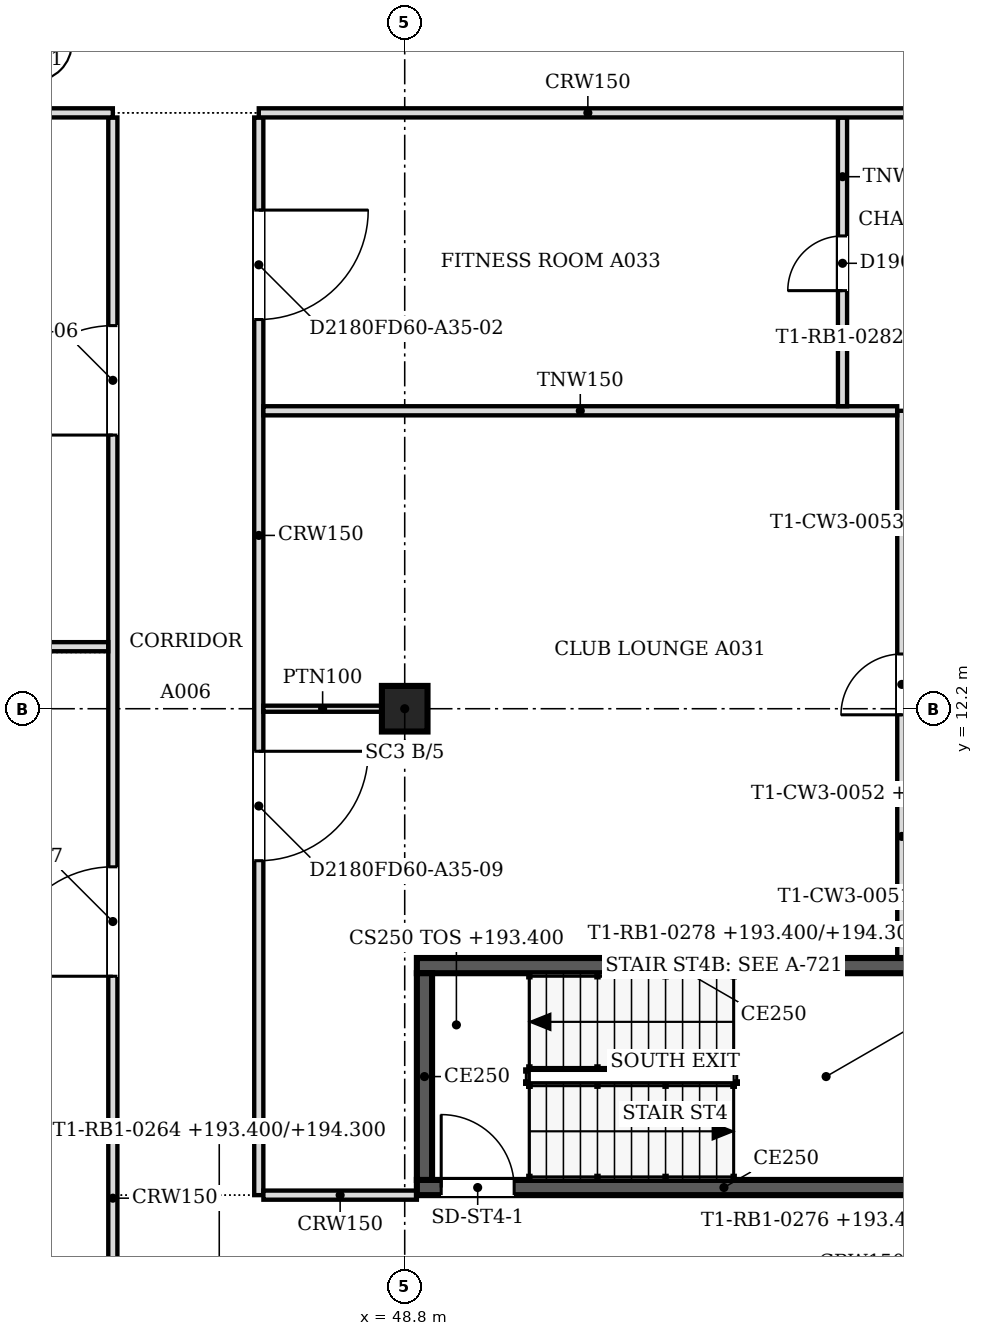
"""IFC4 building model, lengths in metres.
Left out: names, types, materials, properties, quantities, classifications, styles, units other than length and angle.
Written with IfcOpenShell. Run it as: python <this file> out.ifc"""

import sys

from ifc_helpers import new_model, si_unit, direction, frame, frame_2d, origin, origin_2d, place, context, subcontext, project, spatial, rectangle, extrude, source, transform, mapped, element, fill, save


model = new_model("IFC4")
c1 = context("Model", 3, precision=1e-05, world=origin(), true_north=direction((0.0, 1.0)))
c2 = subcontext(c1, "Body", "Model", "MODEL_VIEW")
j1 = project(units=[si_unit("LENGTHUNIT", "METRE"), si_unit("PLANEANGLEUNIT", "RADIAN")], contexts=[c1])
p1 = place(None, origin())
s1 = spatial("IfcSite", under=j1, at=p1, CompositionType="ELEMENT")
p2 = place(p1, origin())
s2 = spatial("IfcBuilding", under=s1, at=p2, CompositionType="ELEMENT")
p3 = place(p2, frame((0.0, 0.0, 193.4)))
s3 = spatial("IfcBuildingStorey", under=s2, at=p3, CompositionType="ELEMENT", Elevation=193.4)
p4 = place(p3, frame((48.8, 12.2, 0.0), z_axis=(0.0, 0.0, 1.0), x_axis=(1.0, 0.0, 0.0)))
e1 = element("IfcColumn", 1, at=p4, inside=s3, PredefinedType="COLUMN", context=c2, shape_type="SweptSolid", body=[
    extrude(rectangle(XDim=0.75, YDim=0.75, at=origin_2d()), origin(), (0.0, 0.0, 1.0), 4.3),
])
p5 = place(p3, frame((57.5, 4.325, 0.0), z_axis=(0.0, 0.0, 1.0), x_axis=(-1.0, 0.0, 0.0)))
e2 = element("IfcWall", 2, at=p5, inside=s3, PredefinedType="SOLIDWALL", context=c2, shape_type="SweptSolid", body=[
    extrude(rectangle(XDim=8.5, YDim=0.25, at=frame_2d((4.25, 0.0))), origin(), (0.0, 0.0, 1.0), 4.5),
])
m1 = source(origin(), c2, "Body", "SweptSolid", [
    extrude(rectangle(XDim=1.2, YDim=2.1, at=frame_2d((0.6, 1.05))), frame((0.0, 0.135, 0.0), z_axis=(0.0, -1.0, 0.0), x_axis=(1.0, 0.0, 0.0)), (0.0, 0.0, 1.0), 0.27),
])
p6 = place(p5, frame((6.9, 0.0, 0.0)))
e3 = element("IfcOpeningElement", 3, at=p6, cuts=e2, PredefinedType="OPENING", context=c2, shape_type="MappedRepresentation", body=[
    mapped(m1, transform((0.0, 0.0, 0.0), scale=1.0)),
])
p7 = place(p3, frame((49.125, 4.45, 0.0), z_axis=(0.0, 0.0, 1.0), x_axis=(0.0, 1.0, 0.0)))
e4 = element("IfcWall", 4, at=p7, inside=s3, PredefinedType="SOLIDWALL", context=c2, shape_type="SweptSolid", body=[
    extrude(rectangle(XDim=3.4, YDim=0.25, at=frame_2d((1.7, 0.0))), origin(), (0.0, 0.0, 1.0), 4.5),
])
p8 = place(p3, frame((49.0, 7.975, 0.0), z_axis=(0.0, 0.0, 1.0), x_axis=(1.0, 0.0, 0.0)))
e5 = element("IfcWall", 5, at=p8, inside=s3, PredefinedType="SOLIDWALL", context=c2, shape_type="SweptSolid", body=[
    extrude(rectangle(XDim=8.5, YDim=0.25, at=frame_2d((4.25, 0.0))), origin(), (0.0, 0.0, 1.0), 4.5),
])
p9 = place(p3, frame((44.0, 0.5, 0.0), z_axis=(0.0, 0.0, 1.0), x_axis=(0.0, 1.0, 0.0)))
e6 = element("IfcWall", 6, at=p9, inside=s3, PredefinedType="PARTITIONING", context=c2, shape_type="SweptSolid", body=[
    extrude(rectangle(XDim=21.424, YDim=0.15, at=frame_2d((10.712, 0.0))), origin(), (0.0, 0.0, 1.0), 3.767),
])
m2 = source(origin(), c2, "Body", "SweptSolid", [
    extrude(rectangle(XDim=1.8, YDim=2.1, at=frame_2d((0.9, 1.05))), frame((0.0, 0.085, 0.0), z_axis=(0.0, -1.0, 0.0), x_axis=(1.0, 0.0, 0.0)), (0.0, 0.0, 1.0), 0.17),
])
p10 = place(p9, frame((16.201, 0.0, 0.0)))
e7 = element("IfcOpeningElement", 7, at=p10, cuts=e6, PredefinedType="OPENING", context=c2, shape_type="MappedRepresentation", body=[
    mapped(m2, transform((0.0, 0.0, 0.0), scale=1.0)),
])
p11 = place(p9, frame((7.3, 0.0, 0.0)))
e8 = element("IfcOpeningElement", 8, at=p11, cuts=e6, PredefinedType="OPENING", context=c2, shape_type="MappedRepresentation", body=[
    mapped(m2, transform((0.0, 0.0, 0.0), scale=1.0)),
])
p12 = place(p3, frame((46.4, 21.924, 0.0), z_axis=(0.0, 0.0, 1.0), x_axis=(0.0, -1.0, 0.0)))
e9 = element("IfcWall", 9, at=p12, inside=s3, PredefinedType="PARTITIONING", context=c2, shape_type="SweptSolid", body=[
    extrude(rectangle(XDim=17.724, YDim=0.15, at=frame_2d((8.862, 0.0))), origin(), (0.0, 0.0, 1.0), 3.767),
])
p13 = place(p12, frame((1.523, 0.0, 0.0)))
e10 = element("IfcOpeningElement", 10, at=p13, cuts=e9, PredefinedType="OPENING", context=c2, shape_type="MappedRepresentation", body=[
    mapped(m2, transform((0.0, 0.0, 0.0), scale=1.0)),
])
p14 = place(p12, frame((10.424, 0.0, 0.0)))
e11 = element("IfcOpeningElement", 11, at=p14, cuts=e9, PredefinedType="OPENING", context=c2, shape_type="MappedRepresentation", body=[
    mapped(m2, transform((0.0, 0.0, 0.0), scale=1.0)),
])
p15 = place(p3, frame((46.476, 4.2, 0.0), z_axis=(0.0, 0.0, 1.0), x_axis=(1.0, 0.0, 0.0)))
e12 = element("IfcWall", 12, at=p15, inside=s3, PredefinedType="PARTITIONING", context=c2, shape_type="SweptSolid", body=[
    extrude(rectangle(XDim=2.524, YDim=0.15, at=frame_2d((1.262, 0.0))), origin(), (0.0, 0.0, 1.0), 3.767),
])
p16 = place(p3, frame((56.975, 17.1, 0.0), z_axis=(0.0, 0.0, 1.0), x_axis=(0.0, -1.0, 0.0)))
e13 = element("IfcWall", 13, at=p16, inside=s3, PredefinedType="PARTITIONING", context=c2, shape_type="SweptSolid", body=[
    extrude(rectangle(XDim=9.0, YDim=0.15, at=frame_2d((4.5, 0.0))), origin(), (0.0, 0.0, 1.0), 3.767),
])
m3 = source(origin(), c2, "Body", "SweptSolid", [
    extrude(rectangle(XDim=1.0, YDim=2.1, at=frame_2d((0.5, 1.05))), frame((0.0, 0.085, 0.0), z_axis=(0.0, -1.0, 0.0), x_axis=(1.0, 0.0, 0.0)), (0.0, 0.0, 1.0), 0.17),
])
p17 = place(p16, frame((4.0, 0.0, 0.0)))
e14 = element("IfcOpeningElement", 14, at=p17, cuts=e13, PredefinedType="OPENING", context=c2, shape_type="MappedRepresentation", body=[
    mapped(m3, transform((0.0, 0.0, 0.0), scale=1.0)),
])
p18 = place(p3, frame((48.425, 12.2, 0.0), z_axis=(0.0, 0.0, 1.0), x_axis=(-1.0, 0.0, 0.0)))
e15 = element("IfcWall", 15, at=p18, inside=s3, PredefinedType="PARTITIONING", context=c2, shape_type="SweptSolid", body=[
    extrude(rectangle(XDim=1.95, YDim=0.1, at=frame_2d((0.975, 0.0))), origin(), (0.0, 0.0, 1.0), 3.767),
])
p19 = place(p3, frame((24.55, 13.22, 0.0), z_axis=(0.0, 0.0, 1.0), x_axis=(1.0, 0.0, 0.0)))
e16 = element("IfcWall", 16, at=p19, inside=s3, PredefinedType="PARTITIONING", context=c2, shape_type="SweptSolid", body=[
    extrude(rectangle(XDim=19.374, YDim=0.15, at=frame_2d((9.687, 0.0))), origin(), (0.0, 0.0, 1.0), 3.767),
])
p20 = place(p3, frame((46.476, 17.1, 0.0), z_axis=(0.0, 0.0, 1.0), x_axis=(1.0, 0.0, 0.0)))
e17 = element("IfcWall", 17, at=p20, inside=s3, PredefinedType="PARTITIONING", context=c2, shape_type="SweptSolid", body=[
    extrude(rectangle(XDim=10.423, YDim=0.15, at=frame_2d((5.211, 0.0))), origin(), (0.0, 0.0, 1.0), 3.767),
])
p21 = place(p3, frame((56.0, 21.924, 0.0), z_axis=(0.0, 0.0, 1.0), x_axis=(0.0, -1.0, 0.0)))
e18 = element("IfcWall", 18, at=p21, inside=s3, PredefinedType="PARTITIONING", context=c2, shape_type="SweptSolid", body=[
    extrude(rectangle(XDim=4.748, YDim=0.15, at=frame_2d((2.374, 0.0))), origin(), (0.0, 0.0, 1.0), 3.767),
])
m4 = source(origin(), c2, "Body", "SweptSolid", [
    extrude(rectangle(XDim=0.9, YDim=2.1, at=frame_2d((0.45, 1.05))), frame((0.0, 0.085, 0.0), z_axis=(0.0, -1.0, 0.0), x_axis=(1.0, 0.0, 0.0)), (0.0, 0.0, 1.0), 0.17),
])
p22 = place(p21, frame((1.948, 0.0, 0.0)))
e19 = element("IfcOpeningElement", 19, at=p22, cuts=e18, PredefinedType="OPENING", context=c2, shape_type="MappedRepresentation", body=[
    mapped(m4, transform((0.0, 0.0, 0.0), scale=1.0)),
])
p23 = place(p3, frame((30.5, 22.0, 0.0), z_axis=(0.0, 0.0, 1.0), x_axis=(1.0, 0.0, 0.0)))
e20 = element("IfcWall", 20, at=p23, inside=s3, PredefinedType="PARTITIONING", context=c2, shape_type="SweptSolid", body=[
    extrude(rectangle(XDim=13.5, YDim=0.15, at=frame_2d((6.75, 0.0))), origin(), (0.0, 0.0, 1.0), 3.767),
])
p24 = place(p3, frame((46.4, 22.0, 0.0), z_axis=(0.0, 0.0, 1.0), x_axis=(1.0, 0.0, 0.0)))
e21 = element("IfcWall", 21, at=p24, inside=s3, PredefinedType="PARTITIONING", context=c2, shape_type="SweptSolid", body=[
    extrude(rectangle(XDim=10.824, YDim=0.15, at=frame_2d((5.412, 0.0))), origin(), (0.0, 0.0, 1.0), 3.767),
])
m5 = source(origin(), c2, "Body", "SweptSolid", [
    extrude(rectangle(XDim=1.2, YDim=2.1, at=frame_2d((0.6, 1.05))), frame((0.0, 0.025, 0.0), z_axis=(0.0, -1.0, 0.0), x_axis=(1.0, 0.0, 0.0)), (0.0, 0.0, 1.0), 0.05),
])
p25 = place(p6, origin())
e22 = element("IfcDoor", 22, at=p25, inside=s3, OperationType="SINGLE_SWING_RIGHT", PredefinedType="DOOR", context=c2, shape_type="MappedRepresentation", body=[
    mapped(m5, transform((0.0, 0.0, 0.0), scale=1.0)),
])
fill(e3, e22)
m6 = source(origin(), c2, "Body", "SweptSolid", [
    extrude(rectangle(XDim=0.9, YDim=2.1, at=frame_2d((0.45, 1.05))), frame((0.0, 0.025, 0.0), z_axis=(0.0, -1.0, 0.0), x_axis=(1.0, 0.0, 0.0)), (0.0, 0.0, 1.0), 0.05),
])
p26 = place(p22, origin())
e23 = element("IfcDoor", 23, at=p26, inside=s3, OperationType="SINGLE_SWING_RIGHT", PredefinedType="DOOR", context=c2, shape_type="MappedRepresentation", body=[
    mapped(m6, transform((0.0, 0.0, 0.0), scale=1.0)),
])
fill(e19, e23)
m7 = source(origin(), c2, "Body", "SweptSolid", [
    extrude(rectangle(XDim=1.8, YDim=2.1, at=frame_2d((0.9, 1.05))), frame((0.0, 0.025, 0.0), z_axis=(0.0, -1.0, 0.0), x_axis=(1.0, 0.0, 0.0)), (0.0, 0.0, 1.0), 0.05),
])
p27 = place(p13, origin())
e24 = element("IfcDoor", 24, at=p27, inside=s3, OperationType="DOUBLE_DOOR_SINGLE_SWING", PredefinedType="DOOR", context=c2, shape_type="MappedRepresentation", body=[
    mapped(m7, transform((0.0, 0.0, 0.0), scale=1.0)),
])
fill(e10, e24)
p28 = place(p10, origin())
e25 = element("IfcDoor", 25, at=p28, inside=s3, OperationType="DOUBLE_DOOR_SINGLE_SWING", PredefinedType="DOOR", context=c2, shape_type="MappedRepresentation", body=[
    mapped(m7, transform((0.0, 0.0, 0.0), scale=1.0)),
])
fill(e7, e25)
p29 = place(p11, origin())
e26 = element("IfcDoor", 26, at=p29, inside=s3, OperationType="DOUBLE_DOOR_SINGLE_SWING", PredefinedType="DOOR", context=c2, shape_type="MappedRepresentation", body=[
    mapped(m7, transform((0.0, 0.0, 0.0), scale=1.0)),
])
fill(e8, e26)
m8 = source(origin(), c2, "Body", "SweptSolid", [
    extrude(rectangle(XDim=1.0, YDim=2.1, at=frame_2d((0.5, 1.05))), frame((0.0, 0.025, 0.0), z_axis=(0.0, -1.0, 0.0), x_axis=(1.0, 0.0, 0.0)), (0.0, 0.0, 1.0), 0.05),
])
p30 = place(p17, origin())
e27 = element("IfcDoor", 27, at=p30, inside=s3, OperationType="SINGLE_SWING_RIGHT", PredefinedType="DOOR", context=c2, shape_type="MappedRepresentation", body=[
    mapped(m8, transform((0.0, 0.0, 0.0), scale=1.0)),
])
fill(e14, e27)
p31 = place(p14, origin())
e28 = element("IfcDoor", 28, at=p31, inside=s3, OperationType="DOUBLE_DOOR_SINGLE_SWING", PredefinedType="DOOR", context=c2, shape_type="MappedRepresentation", body=[
    mapped(m7, transform((0.0, 0.0, 0.0), scale=1.0)),
])
fill(e11, e28)
save(model, sys.argv[1])
